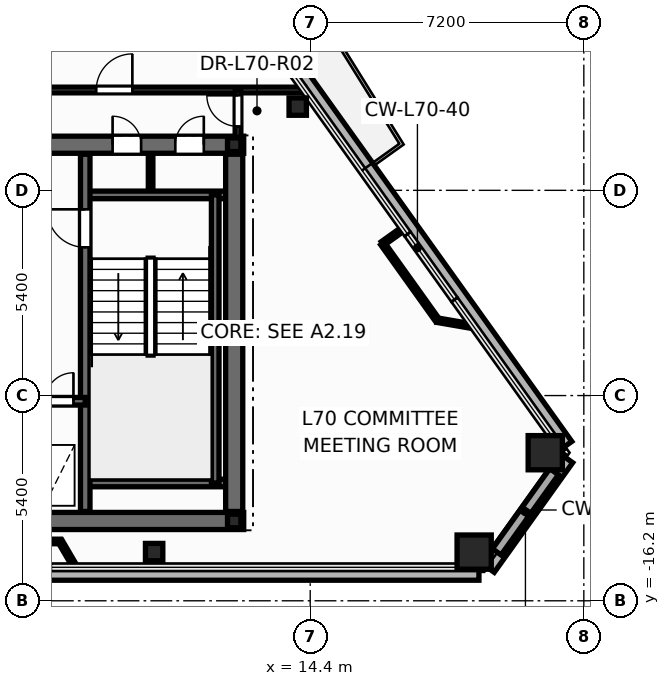
"""IFC4 building model, lengths in metres.
Left out: names, types, materials, properties, quantities, classifications, styles, units other than length and angle.
Written with IfcOpenShell. Run it as: python <this file> out.ifc"""

import sys

from ifc_helpers import new_model, si_unit, direction, frame, frame_2d, origin, origin_2d, place, context, subcontext, project, spatial, rectangle, hollow_rectangle, hollow_circle, i_section, extrude, element, fill, save


model = new_model("IFC4")
c1 = context("Model", 3, precision=1e-05, world=origin(), true_north=direction((0.0, 1.0)))
c2 = subcontext(c1, "Body", "Model", "MODEL_VIEW")
j1 = project(units=[si_unit("LENGTHUNIT", "METRE"), si_unit("PLANEANGLEUNIT", "RADIAN")], contexts=[c1])
p1 = place(None, origin())
s1 = spatial("IfcSite", under=j1, at=p1, CompositionType="ELEMENT")
p2 = place(p1, origin())
s2 = spatial("IfcBuilding", under=s1, at=p2, CompositionType="ELEMENT")
p3 = place(p2, frame((0.0, 0.0, 267.0)))
s3 = spatial("IfcBuildingStorey", under=s2, at=p3, CompositionType="ELEMENT", Elevation=267.0)
for number, where, z_axis, x_axis in (
    (1, (18.714, -14.919, 0.0), (0.0, 0.0, 1.0), (1.0, 0.0, 0.0)),
    (2, (20.585, -12.303, 0.0), (0.0, 0.0, 1.0), (1.0, 0.0, 0.0)),
):
    element("IfcColumn", number, at=place(p3, frame(where, z_axis=z_axis, x_axis=x_axis)), inside=s3, PredefinedType="COLUMN", context=c2, shape_type="SweptSolid", body=[
        extrude(hollow_rectangle(XDim=0.9, YDim=0.9, WallThickness=0.04, at=origin_2d()), origin(), (0.0, 0.0, 1.0), 3.6),
    ])
for number, where, z_axis, x_axis in (
    (3, (10.293, -14.919, 0.0), (0.0, 0.0, 1.0), (1.0, 0.0, 0.0)),
    (4, (14.072, -3.196, 0.0), (0.0, 0.0, 1.0), (1.0, 0.0, 0.0)),
):
    element("IfcColumn", number, at=place(p3, frame(where, z_axis=z_axis, x_axis=x_axis)), inside=s3, PredefinedType="COLUMN", context=c2, shape_type="SweptSolid", body=[
        extrude(hollow_circle(Radius=0.229, WallThickness=0.016, at=origin_2d()), origin(), (0.0, 0.0, 1.0), 3.6),
    ])
for number, where, z_axis, x_axis in (
    (5, (12.4, -14.1, 0.0), (0.0, 0.0, 1.0), (1.0, 0.0, 0.0)),
    (6, (12.4, -4.2, 0.0), (0.0, 0.0, 1.0), (1.0, 0.0, 0.0)),
):
    element("IfcColumn", number, at=place(p3, frame(where, z_axis=z_axis, x_axis=x_axis)), inside=s3, PredefinedType="COLUMN", context=c2, shape_type="SweptSolid", body=[
        extrude(i_section(OverallWidth=0.352, OverallDepth=0.359, WebThickness=0.018, FlangeThickness=0.026, at=origin_2d()), origin(), (0.0, 0.0, 1.0), 3.6),
    ])
p4 = place(p3, frame((-18.84, -15.479, -0.2), z_axis=(0.0, 0.0, 1.0), x_axis=(1.0, 0.0, 0.0)))
e7 = element("IfcWall", 7, at=p4, inside=s3, PredefinedType="PARAPET", context=c2, shape_type="SweptSolid", body=[
    extrude(rectangle(XDim=37.68, YDim=0.36, at=frame_2d((18.84, 0.0))), origin(), (0.0, 0.0, 1.0), 0.38),
])
p5 = place(p3, frame((19.097, -15.347, -0.2), z_axis=(0.0, 0.0, 1.0), x_axis=(0.581765408816, 0.813356630947, 0.0)))
e8 = element("IfcWall", 8, at=p5, inside=s3, PredefinedType="PARAPET", context=c2, shape_type="SweptSolid", body=[
    extrude(rectangle(XDim=3.547, YDim=0.36, at=frame_2d((1.774, 0.0))), origin(), (0.0, 0.0, 1.0), 0.38),
])
p6 = place(p3, frame((21.137, -12.113, -0.2), z_axis=(0.0, 0.0, 1.0), x_axis=(-0.58172961934, 0.813382228711, 0.0)))
e9 = element("IfcWall", 9, at=p6, inside=s3, PredefinedType="PARAPET", context=c2, shape_type="SweptSolid", body=[
    extrude(rectangle(XDim=13.015, YDim=0.36, at=frame_2d((6.507, 0.0))), origin(), (0.0, 0.0, 1.0), 0.38),
])
p7 = place(p3, frame((10.2, -5.52, 0.0), z_axis=(0.0, 0.0, 1.0), x_axis=(0.0, 1.0, 0.0)))
e10 = element("IfcWall", 10, at=p7, inside=s3, PredefinedType="PARTITIONING", context=c2, shape_type="SweptSolid", body=[
    extrude(rectangle(XDim=1.12, YDim=0.12, at=frame_2d((0.56, 0.0))), origin(), (0.0, 0.0, 1.0), 3.345),
])
p8 = place(p3, frame((-12.65, -14.1, 0.0), z_axis=(0.0, 0.0, 1.0), x_axis=(1.0, 0.0, 0.0)))
e11 = element("IfcWall", 11, at=p8, inside=s3, PredefinedType="SHEAR", context=c2, shape_type="SweptSolid", body=[
    extrude(rectangle(XDim=25.3, YDim=0.45, at=frame_2d((12.65, 0.0))), origin(), (0.0, 0.0, 1.0), 3.6),
])
p9 = place(p3, frame((-12.65, -4.2, 0.0), z_axis=(0.0, 0.0, 1.0), x_axis=(1.0, 0.0, 0.0)))
e12 = element("IfcWall", 12, at=p9, inside=s3, PredefinedType="SHEAR", context=c2, shape_type="SweptSolid", body=[
    extrude(rectangle(XDim=25.3, YDim=0.45, at=frame_2d((12.65, 0.0))), origin(), (0.0, 0.0, 1.0), 3.6),
])
p10 = place(p9, frame((1.85, 0.0, 0.0)))
e13 = element("IfcOpeningElement", 13, at=p10, cuts=e12, PredefinedType="OPENING", context=c2, shape_type="SweptSolid", body=[
    extrude(rectangle(XDim=0.756, YDim=2.054, at=frame_2d((0.375, 1.027))), frame((0.0, 0.235, 0.0), z_axis=(0.0, -1.0, 0.0), x_axis=(1.0, 0.0, 0.0)), (0.0, 0.0, 1.0), 0.47),
])
p11 = place(p9, frame((21.85, 0.0, 0.0)))
e14 = element("IfcOpeningElement", 14, at=p11, cuts=e12, PredefinedType="OPENING", context=c2, shape_type="SweptSolid", body=[
    extrude(rectangle(XDim=0.756, YDim=2.054, at=frame_2d((0.375, 1.027))), frame((0.0, 0.235, 0.0), z_axis=(0.0, -1.0, 0.0), x_axis=(1.0, 0.0, 0.0)), (0.0, 0.0, 1.0), 0.47),
])
p12 = place(p9, frame((23.5, 0.0, 0.0)))
e15 = element("IfcOpeningElement", 15, at=p12, cuts=e12, PredefinedType="OPENING", context=c2, shape_type="SweptSolid", body=[
    extrude(rectangle(XDim=0.756, YDim=2.054, at=frame_2d((0.375, 1.027))), frame((0.0, 0.235, 0.0), z_axis=(0.0, -1.0, 0.0), x_axis=(1.0, 0.0, 0.0)), (0.0, 0.0, 1.0), 0.47),
])
p13 = place(p9, frame((5.85, 0.0, 0.0)))
e16 = element("IfcOpeningElement", 16, at=p13, cuts=e12, PredefinedType="OPENING", context=c2, shape_type="SweptSolid", body=[
    extrude(rectangle(XDim=1.006, YDim=2.104, at=frame_2d((0.5, 1.052))), frame((0.0, 0.235, 0.0), z_axis=(0.0, -1.0, 0.0), x_axis=(1.0, 0.0, 0.0)), (0.0, 0.0, 1.0), 0.47),
])
p14 = place(p9, frame((10.35, 0.0, 0.0)))
e17 = element("IfcOpeningElement", 17, at=p14, cuts=e12, PredefinedType="OPENING", context=c2, shape_type="SweptSolid", body=[
    extrude(rectangle(XDim=1.406, YDim=2.154, at=frame_2d((0.7, 1.077))), frame((0.0, 0.235, 0.0), z_axis=(0.0, -1.0, 0.0), x_axis=(1.0, 0.0, 0.0)), (0.0, 0.0, 1.0), 0.47),
])
p15 = place(p9, frame((18.45, 0.0, 0.0)))
e18 = element("IfcOpeningElement", 18, at=p15, cuts=e12, PredefinedType="OPENING", context=c2, shape_type="SweptSolid", body=[
    extrude(rectangle(XDim=1.006, YDim=2.104, at=frame_2d((0.5, 1.052))), frame((0.0, 0.235, 0.0), z_axis=(0.0, -1.0, 0.0), x_axis=(1.0, 0.0, 0.0)), (0.0, 0.0, 1.0), 0.47),
])
for number, where, z_axis, x_axis in (
    (19, (8.48, -5.52, 0.0), (0.0, 0.0, 1.0), (1.0, 0.0, 0.0)),
    (20, (8.48, -13.1, 0.0), (0.0, 0.0, 1.0), (1.0, 0.0, 0.0)),
):
    element("IfcWall", number, at=place(p3, frame(where, z_axis=z_axis, x_axis=x_axis)), inside=s3, PredefinedType="SOLIDWALL", context=c2, shape_type="SweptSolid", body=[
        extrude(rectangle(XDim=3.87, YDim=0.2, at=frame_2d((1.935, 0.0))), origin(), (0.0, 0.0, 1.0), 3.6),
    ])
p16 = place(p3, frame((11.9, -13.1, 0.0), z_axis=(0.0, 0.0, 1.0), x_axis=(0.0, 1.0, 0.0)))
e21 = element("IfcWall", 21, at=p16, inside=s3, PredefinedType="SOLIDWALL", context=c2, shape_type="SweptSolid", body=[
    extrude(rectangle(XDim=7.58, YDim=0.2, at=frame_2d((3.79, 0.0))), origin(), (0.0, 0.0, 1.0), 3.6),
])
p17 = place(p3, frame((8.48, -13.85, 0.0), z_axis=(0.0, 0.0, 1.0), x_axis=(0.0, 1.0, 0.0)))
e22 = element("IfcWall", 22, at=p17, inside=s3, PredefinedType="SHEAR", context=c2, shape_type="SweptSolid", body=[
    extrude(rectangle(XDim=9.4, YDim=0.25, at=frame_2d((4.7, 0.0))), origin(), (0.0, 0.0, 1.0), 3.6),
])
p18 = place(p17, frame((6.95, 0.0, 0.0)))
e23 = element("IfcOpeningElement", 23, at=p18, cuts=e22, PredefinedType="OPENING", context=c2, shape_type="SweptSolid", body=[
    extrude(rectangle(XDim=1.006, YDim=2.104, at=frame_2d((0.5, 1.052))), frame((0.0, 0.135, 0.0), z_axis=(0.0, -1.0, 0.0), x_axis=(1.0, 0.0, 0.0)), (0.0, 0.0, 1.0), 0.27),
])
p19 = place(p3, frame((5.12, -10.95, 0.0), z_axis=(0.0, 0.0, 1.0), x_axis=(1.0, 0.0, 0.0)))
e24 = element("IfcWall", 24, at=p19, inside=s3, PredefinedType="SOLIDWALL", context=c2, shape_type="SweptSolid", body=[
    extrude(rectangle(XDim=3.36, YDim=0.2, at=frame_2d((1.68, 0.0))), origin(), (0.0, 0.0, 1.0), 3.6),
])
p20 = place(p19, frame((0.42, 0.0, 0.0)))
e25 = element("IfcOpeningElement", 25, at=p20, cuts=e24, PredefinedType="OPENING", context=c2, shape_type="SweptSolid", body=[
    extrude(rectangle(XDim=1.106, YDim=2.104, at=frame_2d((0.55, 1.052))), frame((0.0, 0.11, 0.0), z_axis=(0.0, -1.0, 0.0), x_axis=(1.0, 0.0, 0.0)), (0.0, 0.0, 1.0), 0.22),
])
p21 = place(p19, frame((2.3, 0.0, 0.0)))
e26 = element("IfcOpeningElement", 26, at=p21, cuts=e24, PredefinedType="OPENING", context=c2, shape_type="SweptSolid", body=[
    extrude(rectangle(XDim=0.756, YDim=2.054, at=frame_2d((0.375, 1.027))), frame((0.0, 0.11, 0.0), z_axis=(0.0, -1.0, 0.0), x_axis=(1.0, 0.0, 0.0)), (0.0, 0.0, 1.0), 0.22),
])
p22 = place(p3, frame((12.4, -13.85, 0.0), z_axis=(0.0, 0.0, 1.0), x_axis=(0.0, 1.0, 0.0)))
e27 = element("IfcWall", 27, at=p22, inside=s3, PredefinedType="SHEAR", context=c2, shape_type="SweptSolid", body=[
    extrude(rectangle(XDim=9.4, YDim=0.45, at=frame_2d((4.7, 0.0))), origin(), (0.0, 0.0, 1.0), 3.6),
])
p23 = place(p3, frame((7.34, -2.76, 0.0), z_axis=(0.0, 0.0, 1.0), x_axis=(1.0, 0.0, 0.0)))
e28 = element("IfcWall", 28, at=p23, inside=s3, PredefinedType="PARTITIONING", context=c2, shape_type="SweptSolid", body=[
    extrude(rectangle(XDim=6.911, YDim=0.15, at=frame_2d((3.456, 0.0))), origin(), (0.0, 0.0, 1.0), 2.32),
])
p24 = place(p23, frame((1.43, 0.0, 0.0)))
e29 = element("IfcOpeningElement", 29, at=p24, cuts=e28, PredefinedType="OPENING", context=c2, shape_type="SweptSolid", body=[
    extrude(rectangle(XDim=0.956, YDim=2.104, at=frame_2d((0.475, 1.052))), frame((0.0, 0.085, 0.0), z_axis=(0.0, -1.0, 0.0), x_axis=(1.0, 0.0, 0.0)), (0.0, 0.0, 1.0), 0.17),
])
p25 = place(p3, frame((3.329, -14.639, 0.0), z_axis=(0.0, 0.0, 1.0), x_axis=(1.0, 0.0, 0.0)))
e30 = element("IfcWall", 30, at=p25, inside=s3, PredefinedType="PARTITIONING", context=c2, shape_type="SweptSolid", body=[
    extrude(rectangle(XDim=4.493, YDim=0.12, at=frame_2d((2.247, 0.0))), origin(), (0.0, 0.0, 1.0), 3.345),
])
p26 = place(p3, frame((17.747, -8.817, 0.0), z_axis=(0.0, 0.0, 1.0), x_axis=(-0.581750206082, 0.813367504713, 0.0)))
e31 = element("IfcWall", 31, at=p26, inside=s3, PredefinedType="PARTITIONING", context=c2, shape_type="SweptSolid", body=[
    extrude(rectangle(XDim=2.48, YDim=0.12, at=frame_2d((1.24, 0.0))), origin(), (0.0, 0.0, 1.0), 3.345),
])
p27 = place(p3, frame((12.5, -4.24, 0.0), z_axis=(0.0, 0.0, 1.0), x_axis=(0.0, 1.0, 0.0)))
e32 = element("IfcWall", 32, at=p27, inside=s3, PredefinedType="PARTITIONING", context=c2, shape_type="SweptSolid", body=[
    extrude(rectangle(XDim=1.48, YDim=0.15, at=frame_2d((0.74, 0.0))), origin(), (0.0, 0.0, 1.0), 2.32),
])
p28 = place(p27, frame((0.522, 0.0, 0.0)))
e33 = element("IfcOpeningElement", 33, at=p28, cuts=e32, PredefinedType="OPENING", context=c2, shape_type="SweptSolid", body=[
    extrude(rectangle(XDim=0.826, YDim=2.104, at=frame_2d((0.41, 1.052))), frame((0.0, 0.085, 0.0), z_axis=(0.0, -1.0, 0.0), x_axis=(1.0, 0.0, 0.0)), (0.0, 0.0, 1.0), 0.17),
])
p29 = place(p3, frame((18.584, -8.962, 0.0), z_axis=(0.0, 0.0, 1.0), x_axis=(-0.985373712908, 0.170407294183, 0.0)))
e34 = element("IfcWall", 34, at=p29, inside=s3, PredefinedType="PARTITIONING", context=c2, shape_type="SweptSolid", body=[
    extrude(rectangle(XDim=0.85, YDim=0.12, at=frame_2d((0.425, 0.0))), origin(), (0.0, 0.0, 1.0), 2.863),
])
p30 = place(p3, frame((7.822, -14.639, 0.0), z_axis=(0.0, 0.0, 1.0), x_axis=(0.504887737393, -0.863185016453, 0.0)))
e35 = element("IfcWall", 35, at=p30, inside=s3, PredefinedType="PARTITIONING", context=c2, shape_type="SweptSolid", body=[
    extrude(rectangle(XDim=0.776, YDim=0.12, at=frame_2d((0.388, 0.0))), origin(), (0.0, 0.0, 1.0), 2.863),
])
p31 = place(p3, frame((16.304, -6.8, 0.0), z_axis=(0.0, 0.0, 1.0), x_axis=(0.813561114612, 0.581479417341, 0.0)))
e36 = element("IfcWall", 36, at=p31, inside=s3, PredefinedType="PARTITIONING", context=c2, shape_type="SweptSolid", body=[
    extrude(rectangle(XDim=0.67, YDim=0.12, at=frame_2d((0.335, 0.0))), origin(), (0.0, 0.0, 1.0), 2.863),
])
p32 = place(p18, origin())
e37 = element("IfcDoor", 37, at=p32, inside=s3, OperationType="SINGLE_SWING_RIGHT", PredefinedType="DOOR", context=c2, shape_type="SweptSolid", body=[
    extrude(rectangle(XDim=1.0, YDim=2.1, at=frame_2d((0.5, 1.05))), frame((0.0, 0.025, 0.0), z_axis=(0.0, -1.0, 0.0), x_axis=(1.0, 0.0, 0.0)), (0.0, 0.0, 1.0), 0.05),
])
fill(e23, e37)
p33 = place(p21, origin())
e38 = element("IfcDoor", 38, at=p33, inside=s3, OperationType="SINGLE_SWING_RIGHT", PredefinedType="DOOR", context=c2, shape_type="SweptSolid", body=[
    extrude(rectangle(XDim=0.75, YDim=2.05, at=frame_2d((0.375, 1.025))), frame((0.0, 0.025, 0.0), z_axis=(0.0, -1.0, 0.0), x_axis=(1.0, 0.0, 0.0)), (0.0, 0.0, 1.0), 0.05),
])
fill(e26, e38)
p34 = place(p11, origin())
e39 = element("IfcDoor", 39, at=p34, inside=s3, OperationType="SINGLE_SWING_LEFT", PredefinedType="DOOR", context=c2, shape_type="SweptSolid", body=[
    extrude(rectangle(XDim=0.75, YDim=2.05, at=frame_2d((0.375, 1.025))), frame((0.0, 0.025, 0.0), z_axis=(0.0, -1.0, 0.0), x_axis=(1.0, 0.0, 0.0)), (0.0, 0.0, 1.0), 0.05),
])
fill(e14, e39)
p35 = place(p12, origin())
e40 = element("IfcDoor", 40, at=p35, inside=s3, OperationType="SINGLE_SWING_RIGHT", PredefinedType="DOOR", context=c2, shape_type="SweptSolid", body=[
    extrude(rectangle(XDim=0.75, YDim=2.05, at=frame_2d((0.375, 1.025))), frame((0.0, 0.025, 0.0), z_axis=(0.0, -1.0, 0.0), x_axis=(1.0, 0.0, 0.0)), (0.0, 0.0, 1.0), 0.05),
])
fill(e15, e40)
p36 = place(p28, origin())
e41 = element("IfcDoor", 41, at=p36, inside=s3, OperationType="SINGLE_SWING_RIGHT", PredefinedType="DOOR", context=c2, shape_type="SweptSolid", body=[
    extrude(rectangle(XDim=0.82, YDim=2.1, at=frame_2d((0.41, 1.05))), frame((0.0, 0.025, 0.0), z_axis=(0.0, -1.0, 0.0), x_axis=(1.0, 0.0, 0.0)), (0.0, 0.0, 1.0), 0.05),
])
fill(e33, e41)
p37 = place(p24, origin())
e42 = element("IfcDoor", 42, at=p37, inside=s3, OperationType="SINGLE_SWING_RIGHT", PredefinedType="DOOR", context=c2, shape_type="SweptSolid", body=[
    extrude(rectangle(XDim=0.95, YDim=2.1, at=frame_2d((0.475, 1.05))), frame((0.0, 0.025, 0.0), z_axis=(0.0, -1.0, 0.0), x_axis=(1.0, 0.0, 0.0)), (0.0, 0.0, 1.0), 0.05),
])
fill(e29, e42)
save(model, sys.argv[1])
